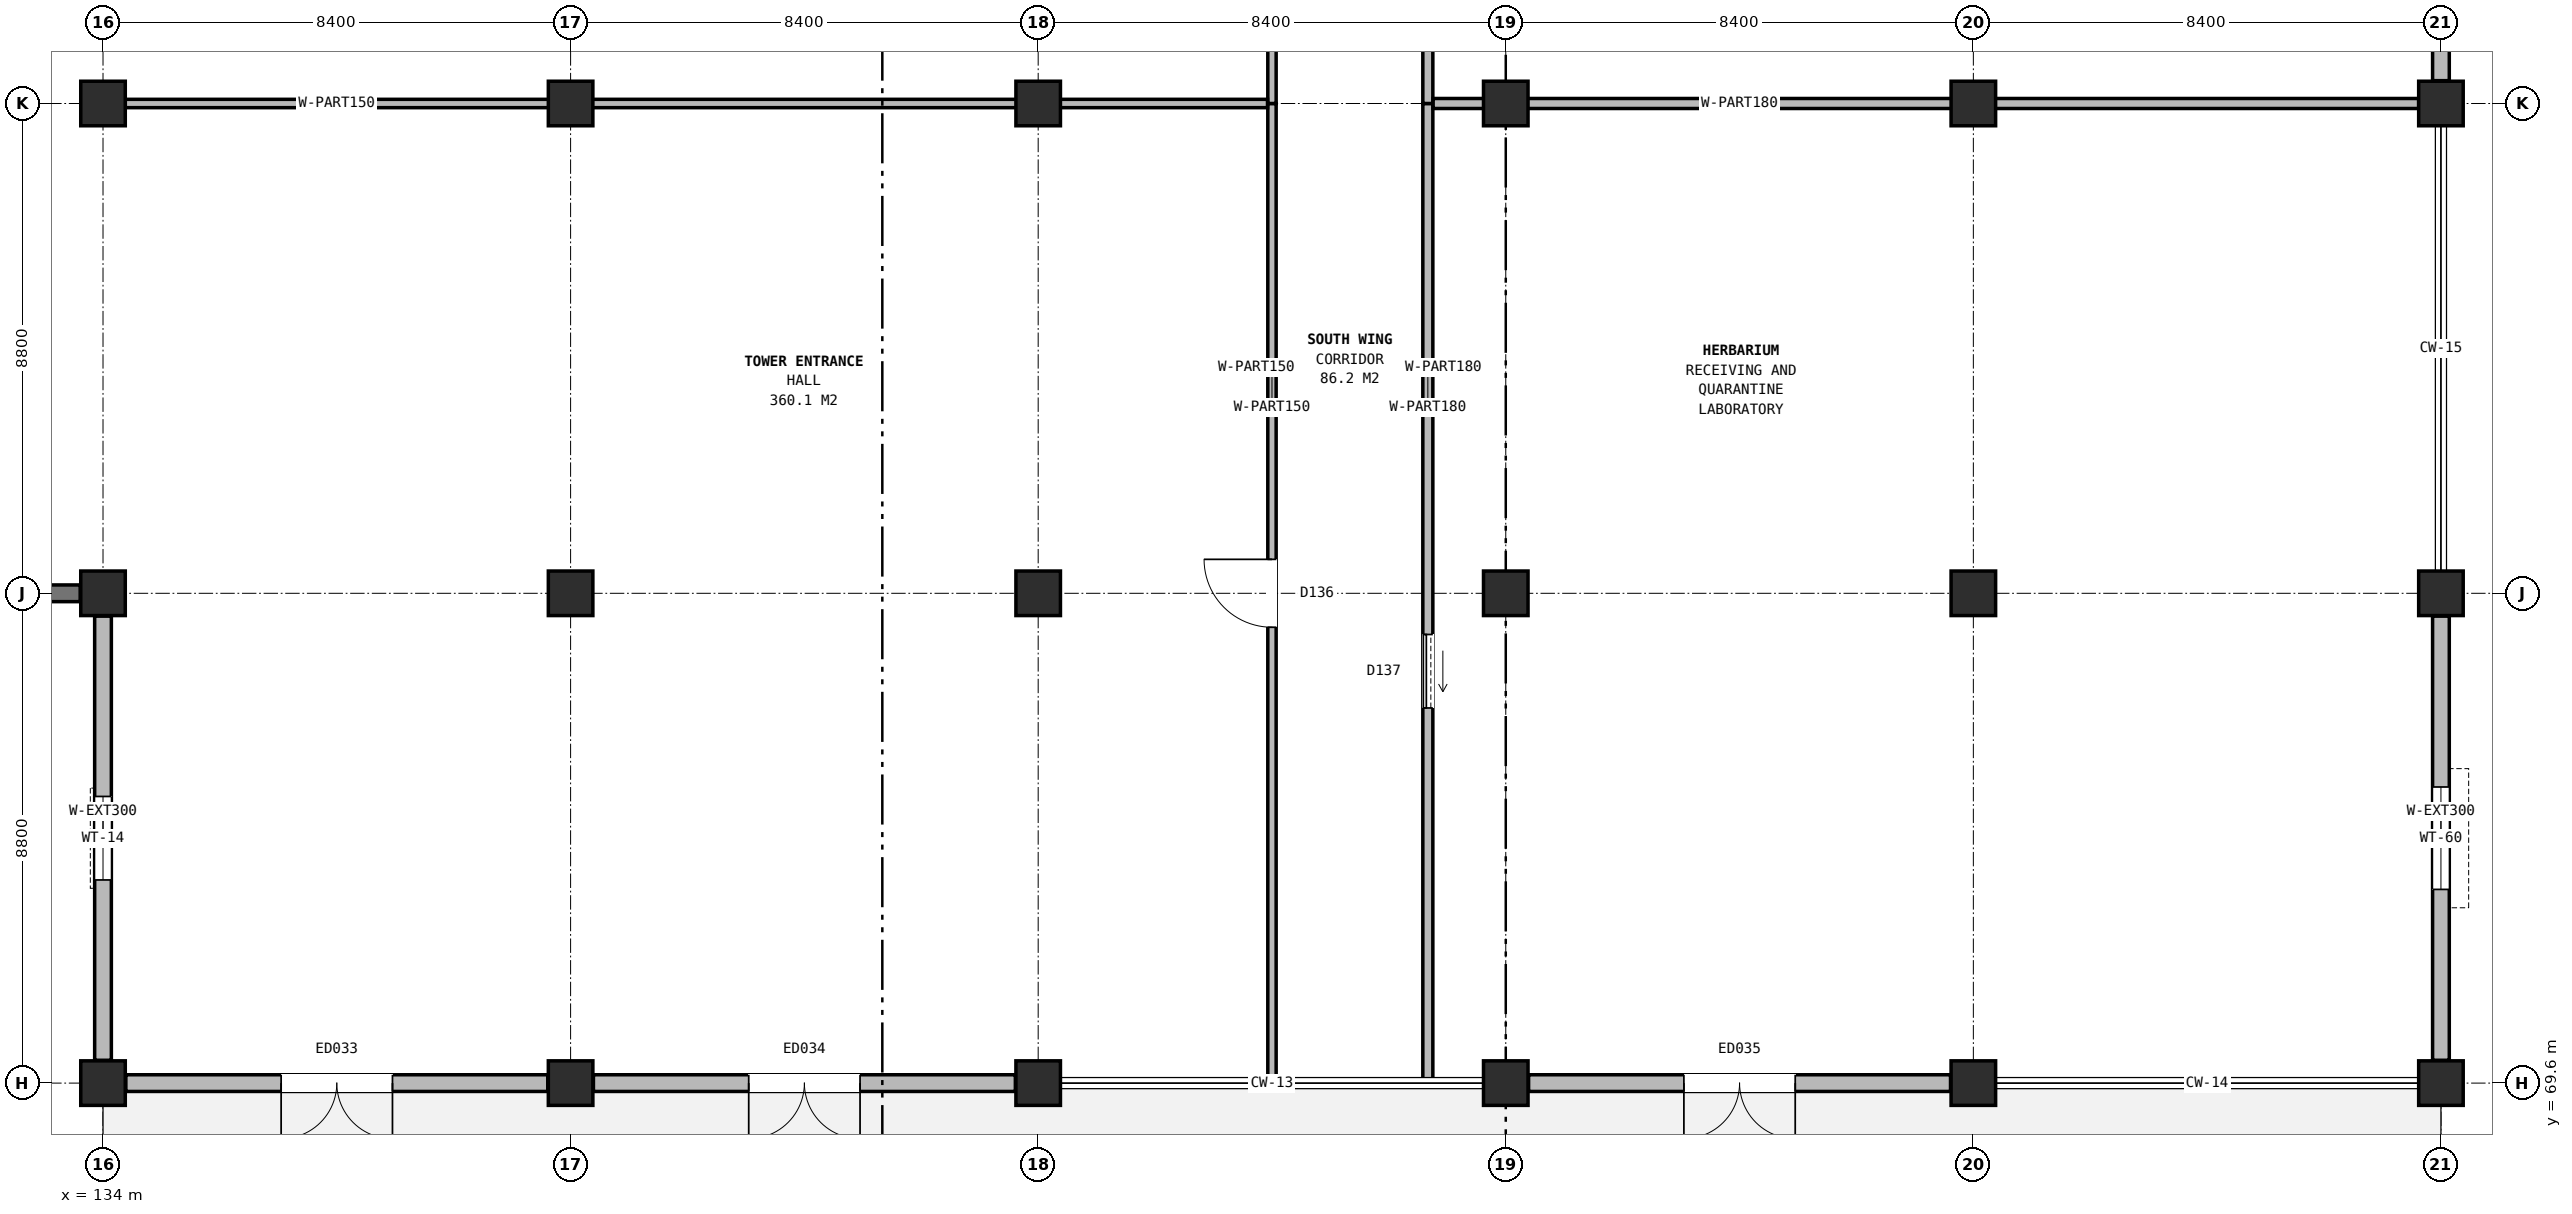
"""IFC4 building model, lengths in metres.
Left out: names, types, materials, properties, quantities, classifications, styles, units other than length and angle.
Written with IfcOpenShell. Run it as: python <this file> out.ifc"""

import sys

from ifc_helpers import new_model, si_unit, direction, frame, frame_2d, origin, origin_2d, place, context, subcontext, project, spatial, rectangle, extrude, element, fill, save


model = new_model("IFC4")
c1 = context("Model", 3, precision=1e-05, world=origin(), true_north=direction((0.0, 1.0)))
c2 = subcontext(c1, "Body", "Model", "MODEL_VIEW")
j1 = project(units=[si_unit("LENGTHUNIT", "METRE"), si_unit("PLANEANGLEUNIT", "RADIAN")], contexts=[c1])
p1 = place(None, origin())
s1 = spatial("IfcSite", under=j1, at=p1, CompositionType="ELEMENT")
p2 = place(p1, origin())
s2 = spatial("IfcBuilding", under=s1, at=p2, CompositionType="ELEMENT")
p3 = place(p2, origin())
s3 = spatial("IfcBuildingStorey", under=s2, at=p3, CompositionType="ELEMENT", Elevation=0.0)
for number, where, z_axis, x_axis in (
    (1, (134.0, 69.6, 0.0), (0.0, 0.0, 1.0), (1.0, 0.0, 0.0)),
    (2, (134.0, 78.4, 0.0), (0.0, 0.0, 1.0), (1.0, 0.0, 0.0)),
    (3, (134.0, 87.2, 0.0), (0.0, 0.0, 1.0), (1.0, 0.0, 0.0)),
    (4, (142.4, 69.6, 0.0), (0.0, 0.0, 1.0), (1.0, 0.0, 0.0)),
    (5, (142.4, 78.4, 0.0), (0.0, 0.0, 1.0), (1.0, 0.0, 0.0)),
    (6, (142.4, 87.2, 0.0), (0.0, 0.0, 1.0), (1.0, 0.0, 0.0)),
    (7, (150.8, 69.6, 0.0), (0.0, 0.0, 1.0), (1.0, 0.0, 0.0)),
    (8, (150.8, 78.4, 0.0), (0.0, 0.0, 1.0), (1.0, 0.0, 0.0)),
    (9, (150.8, 87.2, 0.0), (0.0, 0.0, 1.0), (1.0, 0.0, 0.0)),
    (10, (159.2, 69.6, 0.0), (0.0, 0.0, 1.0), (1.0, 0.0, 0.0)),
    (11, (159.2, 78.4, 0.0), (0.0, 0.0, 1.0), (1.0, 0.0, 0.0)),
    (12, (159.2, 87.2, 0.0), (0.0, 0.0, 1.0), (1.0, 0.0, 0.0)),
    (13, (167.6, 69.6, 0.0), (0.0, 0.0, 1.0), (1.0, 0.0, 0.0)),
    (14, (167.6, 78.4, 0.0), (0.0, 0.0, 1.0), (1.0, 0.0, 0.0)),
    (15, (167.6, 87.2, 0.0), (0.0, 0.0, 1.0), (1.0, 0.0, 0.0)),
    (16, (176.0, 69.6, 0.0), (0.0, 0.0, 1.0), (1.0, 0.0, 0.0)),
    (17, (176.0, 78.4, 0.0), (0.0, 0.0, 1.0), (1.0, 0.0, 0.0)),
    (18, (176.0, 87.2, 0.0), (0.0, 0.0, 1.0), (1.0, 0.0, 0.0)),
):
    element("IfcColumn", number, at=place(p3, frame(where, z_axis=z_axis, x_axis=x_axis)), inside=s3, PredefinedType="COLUMN", context=c2, shape_type="SweptSolid", body=[
        extrude(rectangle(XDim=0.8, YDim=0.8, at=origin_2d()), origin(), (0.0, 0.0, 1.0), 4.8),
    ])
p4 = place(p3, frame((134.41, 69.6, 0.0), z_axis=(0.0, 0.0, 1.0), x_axis=(1.0, 0.0, 0.0)))
e19 = element("IfcWall", 19, at=p4, inside=s3, PredefinedType="SOLIDWALL", context=c2, shape_type="SweptSolid", body=[
    extrude(rectangle(XDim=7.58, YDim=0.3, at=frame_2d((3.79, 0.0))), origin(), (0.0, 0.0, 1.0), 4.05),
])
p5 = place(p4, frame((2.79, 0.0, 0.0)))
e20 = element("IfcOpeningElement", 20, at=p5, cuts=e19, PredefinedType="OPENING", context=c2, shape_type="SweptSolid", body=[
    extrude(rectangle(XDim=2.0, YDim=2.5, at=frame_2d((1.0, 1.25))), frame((0.0, 0.16, 0.0), z_axis=(0.0, -1.0, 0.0), x_axis=(1.0, 0.0, 0.0)), (0.0, 0.0, 1.0), 0.32),
])
p6 = place(p3, frame((142.81, 69.6, 0.0), z_axis=(0.0, 0.0, 1.0), x_axis=(1.0, 0.0, 0.0)))
e21 = element("IfcWall", 21, at=p6, inside=s3, PredefinedType="SOLIDWALL", context=c2, shape_type="SweptSolid", body=[
    extrude(rectangle(XDim=7.58, YDim=0.3, at=frame_2d((3.79, 0.0))), origin(), (0.0, 0.0, 1.0), 4.05),
])
p7 = place(p6, frame((2.79, 0.0, 0.0)))
e22 = element("IfcOpeningElement", 22, at=p7, cuts=e21, PredefinedType="OPENING", context=c2, shape_type="SweptSolid", body=[
    extrude(rectangle(XDim=2.0, YDim=2.5, at=frame_2d((1.0, 1.25))), frame((0.0, 0.16, 0.0), z_axis=(0.0, -1.0, 0.0), x_axis=(1.0, 0.0, 0.0)), (0.0, 0.0, 1.0), 0.32),
])
p8 = place(p3, frame((159.61, 69.6, 0.0), z_axis=(0.0, 0.0, 1.0), x_axis=(1.0, 0.0, 0.0)))
e23 = element("IfcWall", 23, at=p8, inside=s3, PredefinedType="SOLIDWALL", context=c2, shape_type="SweptSolid", body=[
    extrude(rectangle(XDim=7.58, YDim=0.3, at=frame_2d((3.79, 0.0))), origin(), (0.0, 0.0, 1.0), 4.05),
])
p9 = place(p8, frame((2.79, 0.0, 0.0)))
e24 = element("IfcOpeningElement", 24, at=p9, cuts=e23, PredefinedType="OPENING", context=c2, shape_type="SweptSolid", body=[
    extrude(rectangle(XDim=2.0, YDim=2.5, at=frame_2d((1.0, 1.25))), frame((0.0, 0.16, 0.0), z_axis=(0.0, -1.0, 0.0), x_axis=(1.0, 0.0, 0.0)), (0.0, 0.0, 1.0), 0.32),
])
p10 = place(p3, frame((176.0, 70.01, 0.0), z_axis=(0.0, 0.0, 1.0), x_axis=(0.0, 1.0, 0.0)))
e25 = element("IfcWall", 25, at=p10, inside=s3, PredefinedType="SOLIDWALL", context=c2, shape_type="SweptSolid", body=[
    extrude(rectangle(XDim=7.98, YDim=0.3, at=frame_2d((3.99, 0.0))), origin(), (0.0, 0.0, 1.0), 4.05),
])
p11 = place(p10, frame((3.07, 0.0, 0.9)))
e26 = element("IfcOpeningElement", 26, at=p11, cuts=e25, PredefinedType="OPENING", context=c2, shape_type="SweptSolid", body=[
    extrude(rectangle(XDim=1.84, YDim=2.34, at=frame_2d((0.92, 1.17))), frame((0.0, 0.16, 0.0), z_axis=(0.0, -1.0, 0.0), x_axis=(1.0, 0.0, 0.0)), (0.0, 0.0, 1.0), 0.32),
])
p12 = place(p3, frame((176.0, 87.61, 0.0), z_axis=(0.0, 0.0, 1.0), x_axis=(0.0, 1.0, 0.0)))
e27 = element("IfcWall", 27, at=p12, inside=s3, PredefinedType="SOLIDWALL", context=c2, shape_type="SweptSolid", body=[
    extrude(rectangle(XDim=7.98, YDim=0.3, at=frame_2d((3.99, 0.0))), origin(), (0.0, 0.0, 1.0), 4.05),
])
p13 = place(p12, frame((3.39, 0.0, 0.9)))
e28 = element("IfcOpeningElement", 28, at=p13, cuts=e27, PredefinedType="OPENING", context=c2, shape_type="SweptSolid", body=[
    extrude(rectangle(XDim=1.2, YDim=1.8, at=frame_2d((0.6, 0.9))), frame((0.0, 0.16, 0.0), z_axis=(0.0, -1.0, 0.0), x_axis=(1.0, 0.0, 0.0)), (0.0, 0.0, 1.0), 0.32),
])
p14 = place(p3, frame((126.01, 78.4, 0.0), z_axis=(0.0, 0.0, 1.0), x_axis=(1.0, 0.0, 0.0)))
e29 = element("IfcWall", 29, at=p14, inside=s3, PredefinedType="SHEAR", context=c2, shape_type="SweptSolid", body=[
    extrude(rectangle(XDim=7.58, YDim=0.3, at=frame_2d((3.79, 0.0))), origin(), (0.0, 0.0, 1.0), 4.05),
])
p15 = place(p3, frame((134.0, 77.99, 0.0), z_axis=(0.0, 0.0, 1.0), x_axis=(0.0, -1.0, 0.0)))
e30 = element("IfcWall", 30, at=p15, inside=s3, PredefinedType="SOLIDWALL", context=c2, shape_type="SweptSolid", body=[
    extrude(rectangle(XDim=7.98, YDim=0.3, at=frame_2d((3.99, 0.0))), origin(), (0.0, 0.0, 1.0), 4.05),
])
p16 = place(p15, frame((3.24, 0.0, 0.9)))
e31 = element("IfcOpeningElement", 31, at=p16, cuts=e30, PredefinedType="OPENING", context=c2, shape_type="SweptSolid", body=[
    extrude(rectangle(XDim=1.5, YDim=2.2, at=frame_2d((0.75, 1.1))), frame((0.0, 0.16, 0.0), z_axis=(0.0, -1.0, 0.0), x_axis=(1.0, 0.0, 0.0)), (0.0, 0.0, 1.0), 0.32),
])
p17 = place(p3, frame((155.0, 69.6, 0.0), z_axis=(0.0, 0.0, 1.0), x_axis=(0.0, 1.0, 0.0)))
e32 = element("IfcWall", 32, at=p17, inside=s3, PredefinedType="PARTITIONING", context=c2, shape_type="SweptSolid", body=[
    extrude(rectangle(XDim=17.6, YDim=0.15, at=frame_2d((8.8, 0.0))), origin(), (0.0, 0.0, 1.0), 4.465),
])
p18 = place(p17, frame((8.19, 0.0, 0.0)))
e33 = element("IfcOpeningElement", 33, at=p18, cuts=e32, PredefinedType="OPENING", context=c2, shape_type="SweptSolid", body=[
    extrude(rectangle(XDim=1.22, YDim=2.2, at=frame_2d((0.61, 1.1))), frame((0.0, 0.085, 0.0), z_axis=(0.0, -1.0, 0.0), x_axis=(1.0, 0.0, 0.0)), (0.0, 0.0, 1.0), 0.17),
])
p19 = place(p3, frame((157.8, 69.6, 0.0), z_axis=(0.0, 0.0, 1.0), x_axis=(0.0, 1.0, 0.0)))
e34 = element("IfcWall", 34, at=p19, inside=s3, PredefinedType="PARTITIONING", context=c2, shape_type="SweptSolid", body=[
    extrude(rectangle(XDim=17.6, YDim=0.18, at=frame_2d((8.8, 0.0))), origin(), (0.0, 0.0, 1.0), 4.465),
])
p20 = place(p19, frame((6.74, 0.0, 0.0)))
e35 = element("IfcOpeningElement", 35, at=p20, cuts=e34, PredefinedType="OPENING", context=c2, shape_type="SweptSolid", body=[
    extrude(rectangle(XDim=1.32, YDim=2.2, at=frame_2d((0.66, 1.1))), frame((0.0, 0.1, 0.0), z_axis=(0.0, -1.0, 0.0), x_axis=(1.0, 0.0, 0.0)), (0.0, 0.0, 1.0), 0.2),
])
p21 = place(p3, frame((155.0, 87.2, 0.0), z_axis=(0.0, 0.0, 1.0), x_axis=(0.0, 1.0, 0.0)))
e36 = element("IfcWall", 36, at=p21, inside=s3, PredefinedType="PARTITIONING", context=c2, shape_type="SweptSolid", body=[
    extrude(rectangle(XDim=15.12, YDim=0.15, at=frame_2d((7.56, 0.0))), origin(), (0.0, 0.0, 1.0), 4.465),
])
p22 = place(p3, frame((157.8, 87.2, 0.0), z_axis=(0.0, 0.0, 1.0), x_axis=(0.0, 1.0, 0.0)))
e37 = element("IfcWall", 37, at=p22, inside=s3, PredefinedType="PARTITIONING", context=c2, shape_type="SweptSolid", body=[
    extrude(rectangle(XDim=15.105, YDim=0.18, at=frame_2d((7.552, 0.0))), origin(), (0.0, 0.0, 1.0), 4.465),
])
p23 = place(p3, frame((134.4, 87.2, 0.0), z_axis=(0.0, 0.0, 1.0), x_axis=(1.0, 0.0, 0.0)))
e38 = element("IfcWall", 38, at=p23, inside=s3, PredefinedType="PARTITIONING", context=c2, shape_type="SweptSolid", body=[
    extrude(rectangle(XDim=20.52, YDim=0.15, at=frame_2d((10.26, 0.0))), origin(), (0.0, 0.0, 1.0), 4.045),
])
p24 = place(p3, frame((157.895, 87.2, 0.0), z_axis=(0.0, 0.0, 1.0), x_axis=(1.0, 0.0, 0.0)))
e39 = element("IfcWall", 39, at=p24, inside=s3, PredefinedType="PARTITIONING", context=c2, shape_type="SweptSolid", body=[
    extrude(rectangle(XDim=17.705, YDim=0.18, at=frame_2d((8.853, 0.0))), origin(), (0.0, 0.0, 1.0), 4.045),
])
p25 = place(p5, frame((2.0, 0.0, 0.0), z_axis=(0.0, 0.0, 1.0), x_axis=(-1.0, 0.0, 0.0)))
e40 = element("IfcDoor", 40, at=p25, inside=s3, OperationType="DOUBLE_DOOR_SINGLE_SWING", PredefinedType="DOOR", context=c2, shape_type="SweptSolid", body=[
    extrude(rectangle(XDim=2.0, YDim=2.5, at=frame_2d((1.0, 1.25))), frame((0.0, 0.025, 0.0), z_axis=(0.0, -1.0, 0.0), x_axis=(1.0, 0.0, 0.0)), (0.0, 0.0, 1.0), 0.05),
])
fill(e20, e40)
p26 = place(p7, frame((2.0, 0.0, 0.0), z_axis=(0.0, 0.0, 1.0), x_axis=(-1.0, 0.0, 0.0)))
e41 = element("IfcDoor", 41, at=p26, inside=s3, OperationType="DOUBLE_DOOR_SINGLE_SWING", PredefinedType="DOOR", context=c2, shape_type="SweptSolid", body=[
    extrude(rectangle(XDim=2.0, YDim=2.5, at=frame_2d((1.0, 1.25))), frame((0.0, 0.025, 0.0), z_axis=(0.0, -1.0, 0.0), x_axis=(1.0, 0.0, 0.0)), (0.0, 0.0, 1.0), 0.05),
])
fill(e22, e41)
p27 = place(p9, frame((2.0, 0.0, 0.0), z_axis=(0.0, 0.0, 1.0), x_axis=(-1.0, 0.0, 0.0)))
e42 = element("IfcDoor", 42, at=p27, inside=s3, OperationType="DOUBLE_DOOR_SINGLE_SWING", PredefinedType="DOOR", context=c2, shape_type="SweptSolid", body=[
    extrude(rectangle(XDim=2.0, YDim=2.5, at=frame_2d((1.0, 1.25))), frame((0.0, 0.025, 0.0), z_axis=(0.0, -1.0, 0.0), x_axis=(1.0, 0.0, 0.0)), (0.0, 0.0, 1.0), 0.05),
])
fill(e24, e42)
p28 = place(p11, origin())
e43 = element("IfcWindow", 43, at=p28, inside=s3, PartitioningType="SINGLE_PANEL", PredefinedType="WINDOW", context=c2, shape_type="SweptSolid", body=[
    extrude(rectangle(XDim=1.84, YDim=2.34, at=frame_2d((0.92, 1.17))), frame((0.0, 0.03, 0.0), z_axis=(0.0, -1.0, 0.0), x_axis=(1.0, 0.0, 0.0)), (0.0, 0.0, 1.0), 0.06),
])
fill(e26, e43)
p29 = place(p16, origin())
e44 = element("IfcWindow", 44, at=p29, inside=s3, PartitioningType="SINGLE_PANEL", PredefinedType="WINDOW", context=c2, shape_type="SweptSolid", body=[
    extrude(rectangle(XDim=1.5, YDim=2.2, at=frame_2d((0.75, 1.1))), frame((0.0, 0.03, 0.0), z_axis=(0.0, -1.0, 0.0), x_axis=(1.0, 0.0, 0.0)), (0.0, 0.0, 1.0), 0.06),
])
fill(e31, e44)
p30 = place(p18, origin())
e45 = element("IfcDoor", 45, at=p30, inside=s3, OperationType="SINGLE_SWING_RIGHT", PredefinedType="DOOR", context=c2, shape_type="SweptSolid", body=[
    extrude(rectangle(XDim=1.22, YDim=2.2, at=frame_2d((0.61, 1.1))), frame((0.0, 0.025, 0.0), z_axis=(0.0, -1.0, 0.0), x_axis=(1.0, 0.0, 0.0)), (0.0, 0.0, 1.0), 0.05),
])
fill(e33, e45)
p31 = place(p20, origin())
e46 = element("IfcDoor", 46, at=p31, inside=s3, OperationType="SLIDING_TO_LEFT", PredefinedType="DOOR", context=c2, shape_type="SweptSolid", body=[
    extrude(rectangle(XDim=1.32, YDim=2.2, at=frame_2d((0.66, 1.1))), frame((0.0, 0.025, 0.0), z_axis=(0.0, -1.0, 0.0), x_axis=(1.0, 0.0, 0.0)), (0.0, 0.0, 1.0), 0.05),
])
fill(e35, e46)
save(model, sys.argv[1])
